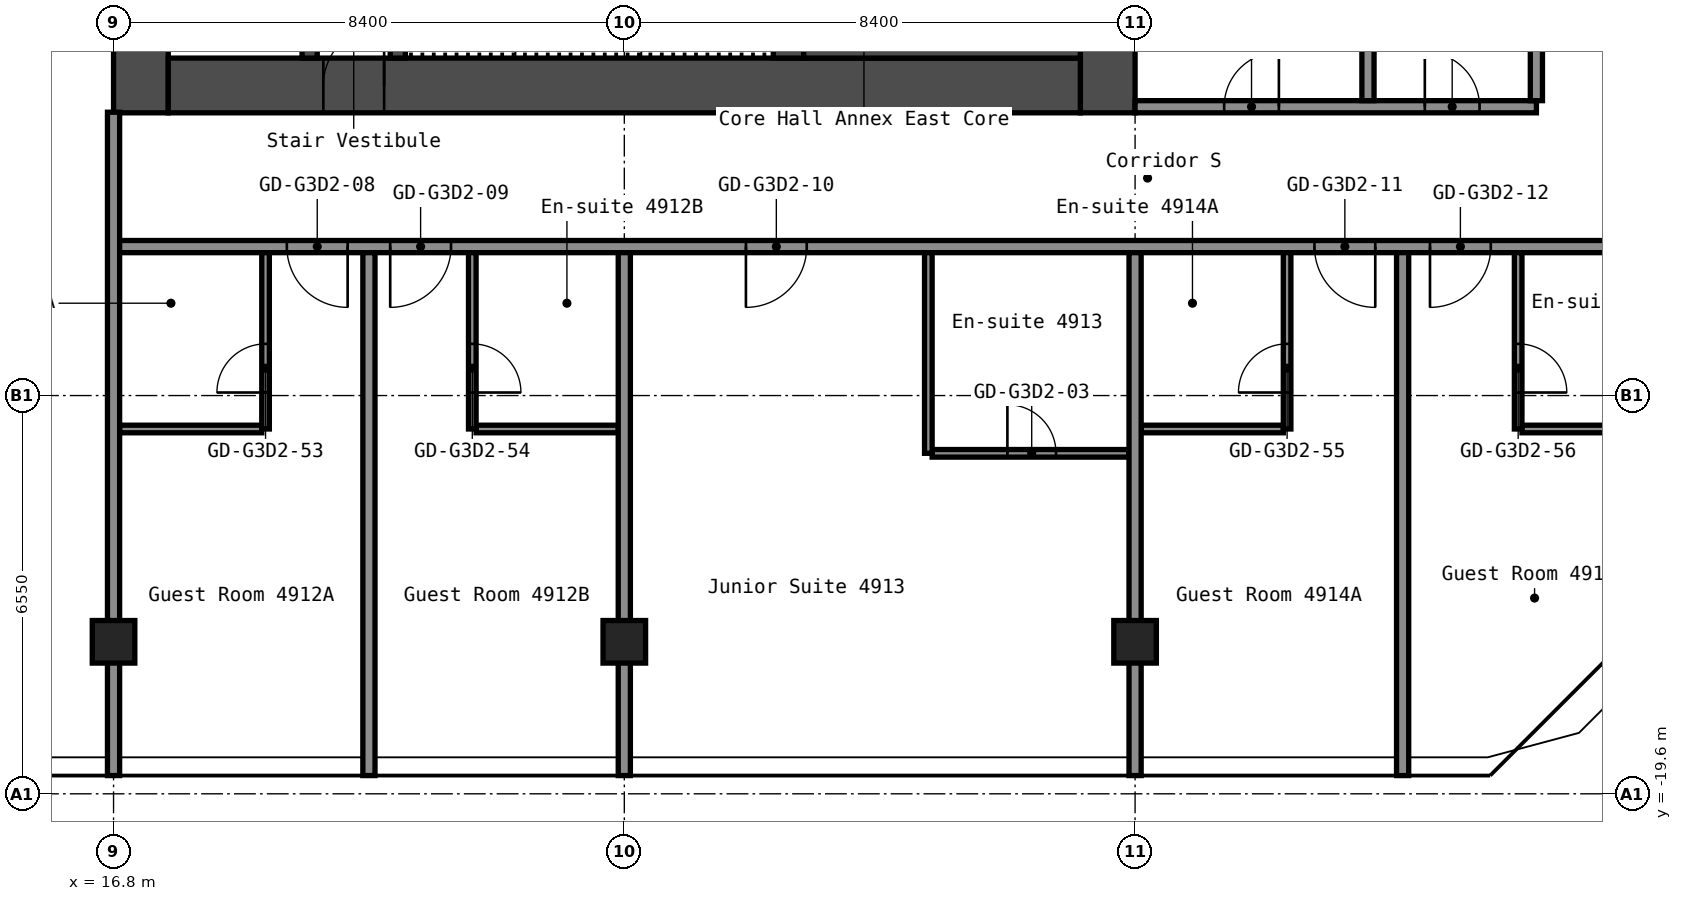
"""IFC4 building model, lengths in metres.
Left out: names, types, materials, properties, quantities, classifications, styles, units other than length and angle.
Written with IfcOpenShell. Run it as: python <this file> out.ifc"""

import sys

from ifc_helpers import new_model, si_unit, direction, frame, frame_2d, origin, origin_2d, place, context, subcontext, project, spatial, rectangle, hollow_rectangle, extrude, element, fill, save


model = new_model("IFC4")
c1 = context("Model", 3, precision=1e-05, world=origin(), true_north=direction((0.0, 1.0)))
c2 = subcontext(c1, "Body", "Model", "MODEL_VIEW")
j1 = project(units=[si_unit("LENGTHUNIT", "METRE"), si_unit("PLANEANGLEUNIT", "RADIAN")], contexts=[c1])
p1 = place(None, origin())
s1 = spatial("IfcSite", under=j1, at=p1, CompositionType="ELEMENT")
p2 = place(p1, origin())
s2 = spatial("IfcBuilding", under=s1, at=p2, CompositionType="ELEMENT")
p3 = place(p2, frame((0.0, 0.0, 172.6)))
s3 = spatial("IfcBuildingStorey", under=s2, at=p3, CompositionType="ELEMENT", Elevation=172.6)
for number, where, z_axis, x_axis in (
    (1, (16.8, -17.1, 0.0), (0.0, 0.0, 1.0), (1.0, 0.0, 0.0)),
    (2, (25.2, -17.1, 0.0), (0.0, 0.0, 1.0), (1.0, 0.0, 0.0)),
    (3, (33.6, -17.1, 0.0), (0.0, 0.0, 1.0), (1.0, 0.0, 0.0)),
):
    element("IfcColumn", number, at=place(p3, frame(where, z_axis=z_axis, x_axis=x_axis)), inside=s3, PredefinedType="COLUMN", context=c2, shape_type="SweptSolid", body=[
        extrude(hollow_rectangle(XDim=0.7, YDim=0.7, WallThickness=0.028, at=origin_2d()), origin(), (0.0, 0.0, 1.0), 2.9),
    ])
p4 = place(p3, frame((17.25, -8.4, 0.0), z_axis=(0.0, 0.0, 1.0), x_axis=(0.0, 1.0, 0.0)))
e4 = element("IfcWall", 4, at=p4, inside=s3, PredefinedType="SHEAR", context=c2, shape_type="SweptSolid", body=[
    extrude(rectangle(XDim=16.8, YDim=0.9, at=frame_2d((8.4, 0.0))), origin(), (0.0, 0.0, 1.0), 2.9),
])
p5 = place(p4, frame((7.1, 0.0, 0.0)))
e5 = element("IfcOpeningElement", 5, at=p5, cuts=e4, PredefinedType="OPENING", context=c2, shape_type="SweptSolid", body=[
    extrude(rectangle(XDim=1.6, YDim=2.1, at=frame_2d((0.8, 1.05))), frame((0.0, 0.46, 0.0), z_axis=(0.0, -1.0, 0.0), x_axis=(1.0, 0.0, 0.0)), (0.0, 0.0, 1.0), 0.92),
])
p6 = place(p3, frame((33.15, -8.4, 0.0), z_axis=(0.0, 0.0, 1.0), x_axis=(0.0, 1.0, 0.0)))
e6 = element("IfcWall", 6, at=p6, inside=s3, PredefinedType="SHEAR", context=c2, shape_type="SweptSolid", body=[
    extrude(rectangle(XDim=16.8, YDim=0.9, at=frame_2d((8.4, 0.0))), origin(), (0.0, 0.0, 1.0), 2.9),
])
p7 = place(p3, frame((17.7, -7.95, 0.0), z_axis=(0.0, 0.0, 1.0), x_axis=(1.0, 0.0, 0.0)))
e7 = element("IfcWall", 7, at=p7, inside=s3, PredefinedType="SHEAR", context=c2, shape_type="SweptSolid", body=[
    extrude(rectangle(XDim=15.0, YDim=0.9, at=frame_2d((7.5, 0.0))), origin(), (0.0, 0.0, 1.0), 2.9),
])
p8 = place(p7, frame((2.55, 0.0, 0.0)))
e8 = element("IfcOpeningElement", 8, at=p8, cuts=e7, PredefinedType="OPENING", context=c2, shape_type="SweptSolid", body=[
    extrude(rectangle(XDim=1.0, YDim=2.1, at=frame_2d((0.5, 1.05))), frame((0.0, 0.46, 0.0), z_axis=(0.0, -1.0, 0.0), x_axis=(1.0, 0.0, 0.0)), (0.0, 0.0, 1.0), 0.92),
])
p9 = place(p3, frame((20.025, -7.5, 0.0), z_axis=(0.0, 0.0, 1.0), x_axis=(0.0, 1.0, 0.0)))
e9 = element("IfcWall", 9, at=p9, inside=s3, PredefinedType="SHEAR", context=c2, shape_type="SweptSolid", body=[
    extrude(rectangle(XDim=6.3, YDim=0.25, at=frame_2d((3.15, 0.0))), origin(), (0.0, 0.0, 1.0), 2.9),
])
p10 = place(p9, frame((2.4, 0.0, 0.0)))
e10 = element("IfcOpeningElement", 10, at=p10, cuts=e9, PredefinedType="OPENING", context=c2, shape_type="SweptSolid", body=[
    extrude(rectangle(XDim=1.0, YDim=2.1, at=frame_2d((0.5, 1.05))), frame((0.0, 0.135, 0.0), z_axis=(0.0, -1.0, 0.0), x_axis=(1.0, 0.0, 0.0)), (0.0, 0.0, 1.0), 0.27),
])
p11 = place(p3, frame((21.475, -7.5, 0.0), z_axis=(0.0, 0.0, 1.0), x_axis=(0.0, 1.0, 0.0)))
e11 = element("IfcWall", 11, at=p11, inside=s3, PredefinedType="SHEAR", context=c2, shape_type="SweptSolid", body=[
    extrude(rectangle(XDim=3.75, YDim=0.25, at=frame_2d((1.875, 0.0))), origin(), (0.0, 0.0, 1.0), 2.9),
])
p12 = place(p11, frame((1.3, 0.0, 0.0)))
e12 = element("IfcOpeningElement", 12, at=p12, cuts=e11, PredefinedType="OPENING", context=c2, shape_type="SweptSolid", body=[
    extrude(rectangle(XDim=1.2, YDim=2.1, at=frame_2d((0.6, 1.05))), frame((0.0, 0.135, 0.0), z_axis=(0.0, -1.0, 0.0), x_axis=(1.0, 0.0, 0.0)), (0.0, 0.0, 1.0), 0.27),
])
p13 = place(p3, frame((27.9, -7.5, 0.0), z_axis=(0.0, 0.0, 1.0), x_axis=(0.0, 1.0, 0.0)))
e13 = element("IfcWall", 13, at=p13, inside=s3, PredefinedType="SHEAR", context=c2, shape_type="SweptSolid", body=[
    extrude(rectangle(XDim=3.75, YDim=0.5, at=frame_2d((1.875, 0.0))), origin(), (0.0, 0.0, 1.0), 2.9),
])
p14 = place(p3, frame((28.15, -6.75, 0.0), z_axis=(0.0, 0.0, 1.0), x_axis=(1.0, 0.0, 0.0)))
e14 = element("IfcWall", 14, at=p14, inside=s3, PredefinedType="SHEAR", context=c2, shape_type="SweptSolid", body=[
    extrude(rectangle(XDim=4.55, YDim=1.5, at=frame_2d((2.275, 0.0))), origin(), (0.0, 0.0, 1.0), 2.9),
])
p15 = place(p3, frame((30.262, -14.0, 0.0), z_axis=(0.0, 0.0, 1.0), x_axis=(1.0, 0.0, 0.0)))
e15 = element("IfcWall", 15, at=p15, inside=s3, PredefinedType="PARTITIONING", context=c2, shape_type="SweptSolid", body=[
    extrude(rectangle(XDim=3.238, YDim=0.125, at=frame_2d((1.619, 0.0))), origin(), (0.0, 0.0, 1.0), 2.9),
])
p16 = place(p15, frame((1.238, 0.0, 0.0)))
e16 = element("IfcOpeningElement", 16, at=p16, cuts=e15, PredefinedType="OPENING", context=c2, shape_type="SweptSolid", body=[
    extrude(rectangle(XDim=0.8, YDim=2.1, at=frame_2d((0.4, 1.05))), frame((0.0, 0.073, 0.0), z_axis=(0.0, -1.0, 0.0), x_axis=(1.0, 0.0, 0.0)), (0.0, 0.0, 1.0), 0.145),
])
for number, where, z_axis, x_axis in (
    (17, (16.9, -13.6, 0.0), (0.0, 0.0, 1.0), (1.0, 0.0, 0.0)),
    (18, (22.762, -13.6, 0.0), (0.0, 0.0, 1.0), (1.0, 0.0, 0.0)),
    (19, (33.7, -13.6, 0.0), (0.0, 0.0, 1.0), (1.0, 0.0, 0.0)),
):
    element("IfcWall", number, at=place(p3, frame(where, z_axis=z_axis, x_axis=x_axis)), inside=s3, PredefinedType="PARTITIONING", context=c2, shape_type="SweptSolid", body=[
        extrude(rectangle(XDim=2.338, YDim=0.125, at=frame_2d((1.169, 0.0))), origin(), (0.0, 0.0, 1.0), 2.9),
    ])
p17 = place(p3, frame((39.962, -13.6, 0.0), z_axis=(0.0, 0.0, 1.0), x_axis=(1.0, 0.0, 0.0)))
e20 = element("IfcWall", 20, at=p17, inside=s3, PredefinedType="PARTITIONING", context=c2, shape_type="SweptSolid", body=[
    extrude(rectangle(XDim=2.738, YDim=0.125, at=frame_2d((1.369, 0.0))), origin(), (0.0, 0.0, 1.0), 2.9),
])
p18 = place(p3, frame((16.8, -10.6, 0.0), z_axis=(0.0, 0.0, 1.0), x_axis=(1.0, 0.0, 0.0)))
e21 = element("IfcWall", 21, at=p18, inside=s3, PredefinedType="PARTITIONING", context=c2, shape_type="SweptSolid", body=[
    extrude(rectangle(XDim=25.9, YDim=0.2, at=frame_2d((12.95, 0.0))), origin(), (0.0, 0.0, 1.0), 2.9),
])
p19 = place(p18, frame((2.85, 0.0, 0.0)))
e22 = element("IfcOpeningElement", 22, at=p19, cuts=e21, PredefinedType="OPENING", context=c2, shape_type="SweptSolid", body=[
    extrude(rectangle(XDim=1.0, YDim=2.1, at=frame_2d((0.5, 1.05))), frame((0.0, 0.11, 0.0), z_axis=(0.0, -1.0, 0.0), x_axis=(1.0, 0.0, 0.0)), (0.0, 0.0, 1.0), 0.22),
])
p20 = place(p18, frame((4.55, 0.0, 0.0)))
e23 = element("IfcOpeningElement", 23, at=p20, cuts=e21, PredefinedType="OPENING", context=c2, shape_type="SweptSolid", body=[
    extrude(rectangle(XDim=1.0, YDim=2.1, at=frame_2d((0.5, 1.05))), frame((0.0, 0.11, 0.0), z_axis=(0.0, -1.0, 0.0), x_axis=(1.0, 0.0, 0.0)), (0.0, 0.0, 1.0), 0.22),
])
p21 = place(p18, frame((10.4, 0.0, 0.0)))
e24 = element("IfcOpeningElement", 24, at=p21, cuts=e21, PredefinedType="OPENING", context=c2, shape_type="SweptSolid", body=[
    extrude(rectangle(XDim=1.0, YDim=2.1, at=frame_2d((0.5, 1.05))), frame((0.0, 0.11, 0.0), z_axis=(0.0, -1.0, 0.0), x_axis=(1.0, 0.0, 0.0)), (0.0, 0.0, 1.0), 0.22),
])
p22 = place(p18, frame((19.75, 0.0, 0.0)))
e25 = element("IfcOpeningElement", 25, at=p22, cuts=e21, PredefinedType="OPENING", context=c2, shape_type="SweptSolid", body=[
    extrude(rectangle(XDim=1.0, YDim=2.1, at=frame_2d((0.5, 1.05))), frame((0.0, 0.11, 0.0), z_axis=(0.0, -1.0, 0.0), x_axis=(1.0, 0.0, 0.0)), (0.0, 0.0, 1.0), 0.22),
])
p23 = place(p18, frame((21.65, 0.0, 0.0)))
e26 = element("IfcOpeningElement", 26, at=p23, cuts=e21, PredefinedType="OPENING", context=c2, shape_type="SweptSolid", body=[
    extrude(rectangle(XDim=1.0, YDim=2.1, at=frame_2d((0.5, 1.05))), frame((0.0, 0.11, 0.0), z_axis=(0.0, -1.0, 0.0), x_axis=(1.0, 0.0, 0.0)), (0.0, 0.0, 1.0), 0.22),
])
p24 = place(p3, frame((33.6, -8.3, 0.0), z_axis=(0.0, 0.0, 1.0), x_axis=(1.0, 0.0, 0.0)))
e27 = element("IfcWall", 27, at=p24, inside=s3, PredefinedType="PARTITIONING", context=c2, shape_type="SweptSolid", body=[
    extrude(rectangle(XDim=6.6, YDim=0.2, at=frame_2d((3.3, 0.0))), origin(), (0.0, 0.0, 1.0), 2.9),
])
p25 = place(p24, frame((1.465, 0.0, 0.0)))
e28 = element("IfcOpeningElement", 28, at=p25, cuts=e27, PredefinedType="OPENING", context=c2, shape_type="SweptSolid", body=[
    extrude(rectangle(XDim=0.9, YDim=2.1, at=frame_2d((0.45, 1.05))), frame((0.0, 0.11, 0.0), z_axis=(0.0, -1.0, 0.0), x_axis=(1.0, 0.0, 0.0)), (0.0, 0.0, 1.0), 0.22),
])
p26 = place(p24, frame((4.765, 0.0, 0.0)))
e29 = element("IfcOpeningElement", 29, at=p26, cuts=e27, PredefinedType="OPENING", context=c2, shape_type="SweptSolid", body=[
    extrude(rectangle(XDim=0.9, YDim=2.1, at=frame_2d((0.45, 1.05))), frame((0.0, 0.11, 0.0), z_axis=(0.0, -1.0, 0.0), x_axis=(1.0, 0.0, 0.0)), (0.0, 0.0, 1.0), 0.22),
])
p27 = place(p3, frame((16.8, -19.3, 0.0), z_axis=(0.0, 0.0, 1.0), x_axis=(0.0, 1.0, 0.0)))
e30 = element("IfcWall", 30, at=p27, inside=s3, PredefinedType="PARTITIONING", context=c2, shape_type="SweptSolid", body=[
    extrude(rectangle(XDim=10.91, YDim=0.2, at=frame_2d((5.455, 0.0))), origin(), (0.0, 0.0, 1.0), 2.9),
])
p28 = place(p3, frame((19.3, -13.6, 0.0), z_axis=(0.0, 0.0, 1.0), x_axis=(0.0, 1.0, 0.0)))
e31 = element("IfcWall", 31, at=p28, inside=s3, PredefinedType="PARTITIONING", context=c2, shape_type="SweptSolid", body=[
    extrude(rectangle(XDim=2.9, YDim=0.125, at=frame_2d((1.45, 0.0))), origin(), (0.0, 0.0, 1.0), 2.9),
])
p29 = place(p28, frame((0.6, 0.0, 0.0)))
e32 = element("IfcOpeningElement", 32, at=p29, cuts=e31, PredefinedType="OPENING", context=c2, shape_type="SweptSolid", body=[
    extrude(rectangle(XDim=0.8, YDim=2.1, at=frame_2d((0.4, 1.05))), frame((0.0, 0.073, 0.0), z_axis=(0.0, -1.0, 0.0), x_axis=(1.0, 0.0, 0.0)), (0.0, 0.0, 1.0), 0.145),
])
p30 = place(p3, frame((21.0, -19.3, 0.0), z_axis=(0.0, 0.0, 1.0), x_axis=(0.0, 1.0, 0.0)))
e33 = element("IfcWall", 33, at=p30, inside=s3, PredefinedType="PARTITIONING", context=c2, shape_type="SweptSolid", body=[
    extrude(rectangle(XDim=8.6, YDim=0.2, at=frame_2d((4.3, 0.0))), origin(), (0.0, 0.0, 1.0), 2.9),
])
p31 = place(p3, frame((22.7, -13.6, 0.0), z_axis=(0.0, 0.0, 1.0), x_axis=(0.0, 1.0, 0.0)))
e34 = element("IfcWall", 34, at=p31, inside=s3, PredefinedType="PARTITIONING", context=c2, shape_type="SweptSolid", body=[
    extrude(rectangle(XDim=2.9, YDim=0.125, at=frame_2d((1.45, 0.0))), origin(), (0.0, 0.0, 1.0), 2.9),
])
p32 = place(p31, frame((0.6, 0.0, 0.0)))
e35 = element("IfcOpeningElement", 35, at=p32, cuts=e34, PredefinedType="OPENING", context=c2, shape_type="SweptSolid", body=[
    extrude(rectangle(XDim=0.8, YDim=2.1, at=frame_2d((0.4, 1.05))), frame((0.0, 0.073, 0.0), z_axis=(0.0, -1.0, 0.0), x_axis=(1.0, 0.0, 0.0)), (0.0, 0.0, 1.0), 0.145),
])
p33 = place(p3, frame((25.2, -19.3, 0.0), z_axis=(0.0, 0.0, 1.0), x_axis=(0.0, 1.0, 0.0)))
e36 = element("IfcWall", 36, at=p33, inside=s3, PredefinedType="PARTITIONING", context=c2, shape_type="SweptSolid", body=[
    extrude(rectangle(XDim=8.6, YDim=0.2, at=frame_2d((4.3, 0.0))), origin(), (0.0, 0.0, 1.0), 2.9),
])
p34 = place(p3, frame((30.2, -14.0, 0.0), z_axis=(0.0, 0.0, 1.0), x_axis=(0.0, 1.0, 0.0)))
e37 = element("IfcWall", 37, at=p34, inside=s3, PredefinedType="PARTITIONING", context=c2, shape_type="SweptSolid", body=[
    extrude(rectangle(XDim=3.3, YDim=0.125, at=frame_2d((1.65, 0.0))), origin(), (0.0, 0.0, 1.0), 2.9),
])
p35 = place(p3, frame((33.6, -19.3, 0.0), z_axis=(0.0, 0.0, 1.0), x_axis=(0.0, 1.0, 0.0)))
e38 = element("IfcWall", 38, at=p35, inside=s3, PredefinedType="PARTITIONING", context=c2, shape_type="SweptSolid", body=[
    extrude(rectangle(XDim=8.6, YDim=0.2, at=frame_2d((4.3, 0.0))), origin(), (0.0, 0.0, 1.0), 2.9),
])
p36 = place(p3, frame((36.1, -13.6, 0.0), z_axis=(0.0, 0.0, 1.0), x_axis=(0.0, 1.0, 0.0)))
e39 = element("IfcWall", 39, at=p36, inside=s3, PredefinedType="PARTITIONING", context=c2, shape_type="SweptSolid", body=[
    extrude(rectangle(XDim=2.9, YDim=0.125, at=frame_2d((1.45, 0.0))), origin(), (0.0, 0.0, 1.0), 2.9),
])
p37 = place(p36, frame((0.6, 0.0, 0.0)))
e40 = element("IfcOpeningElement", 40, at=p37, cuts=e39, PredefinedType="OPENING", context=c2, shape_type="SweptSolid", body=[
    extrude(rectangle(XDim=0.8, YDim=2.1, at=frame_2d((0.4, 1.05))), frame((0.0, 0.073, 0.0), z_axis=(0.0, -1.0, 0.0), x_axis=(1.0, 0.0, 0.0)), (0.0, 0.0, 1.0), 0.145),
])
p38 = place(p3, frame((37.43, -8.2, 0.0), z_axis=(0.0, 0.0, 1.0), x_axis=(0.0, 1.0, 0.0)))
e41 = element("IfcWall", 41, at=p38, inside=s3, PredefinedType="PARTITIONING", context=c2, shape_type="SweptSolid", body=[
    extrude(rectangle(XDim=8.2, YDim=0.2, at=frame_2d((4.1, 0.0))), origin(), (0.0, 0.0, 1.0), 2.9),
])
p39 = place(p3, frame((38.0, -19.3, 0.0), z_axis=(0.0, 0.0, 1.0), x_axis=(0.0, 1.0, 0.0)))
e42 = element("IfcWall", 42, at=p39, inside=s3, PredefinedType="PARTITIONING", context=c2, shape_type="SweptSolid", body=[
    extrude(rectangle(XDim=8.6, YDim=0.2, at=frame_2d((4.3, 0.0))), origin(), (0.0, 0.0, 1.0), 2.9),
])
p40 = place(p3, frame((39.9, -13.6, 0.0), z_axis=(0.0, 0.0, 1.0), x_axis=(0.0, 1.0, 0.0)))
e43 = element("IfcWall", 43, at=p40, inside=s3, PredefinedType="PARTITIONING", context=c2, shape_type="SweptSolid", body=[
    extrude(rectangle(XDim=2.9, YDim=0.125, at=frame_2d((1.45, 0.0))), origin(), (0.0, 0.0, 1.0), 2.9),
])
p41 = place(p40, frame((0.6, 0.0, 0.0)))
e44 = element("IfcOpeningElement", 44, at=p41, cuts=e43, PredefinedType="OPENING", context=c2, shape_type="SweptSolid", body=[
    extrude(rectangle(XDim=0.8, YDim=2.1, at=frame_2d((0.4, 1.05))), frame((0.0, 0.073, 0.0), z_axis=(0.0, -1.0, 0.0), x_axis=(1.0, 0.0, 0.0)), (0.0, 0.0, 1.0), 0.145),
])
p42 = place(p3, frame((40.2, -8.2, 0.0), z_axis=(0.0, 0.0, 1.0), x_axis=(0.0, 1.0, 0.0)))
e45 = element("IfcWall", 45, at=p42, inside=s3, PredefinedType="PARTITIONING", context=c2, shape_type="SweptSolid", body=[
    extrude(rectangle(XDim=16.4, YDim=0.2, at=frame_2d((8.2, 0.0))), origin(), (0.0, 0.0, 1.0), 2.9),
])
p43 = place(p8, origin())
e46 = element("IfcDoor", 46, at=p43, inside=s3, OperationType="SINGLE_SWING_LEFT", PredefinedType="DOOR", context=c2, shape_type="SweptSolid", body=[
    extrude(rectangle(XDim=1.0, YDim=2.1, at=frame_2d((0.5, 1.05))), frame((0.0, 0.025, 0.0), z_axis=(0.0, -1.0, 0.0), x_axis=(1.0, 0.0, 0.0)), (0.0, 0.0, 1.0), 0.05),
])
fill(e8, e46)
p44 = place(p16, origin())
e47 = element("IfcDoor", 47, at=p44, inside=s3, OperationType="SINGLE_SWING_RIGHT", PredefinedType="DOOR", context=c2, shape_type="SweptSolid", body=[
    extrude(rectangle(XDim=0.8, YDim=2.1, at=frame_2d((0.4, 1.05))), frame((0.0, 0.025, 0.0), z_axis=(0.0, -1.0, 0.0), x_axis=(1.0, 0.0, 0.0)), (0.0, 0.0, 1.0), 0.05),
])
fill(e16, e47)
p45 = place(p19, origin())
e48 = element("IfcDoor", 48, at=p45, inside=s3, OperationType="SINGLE_SWING_RIGHT", PredefinedType="DOOR", context=c2, shape_type="SweptSolid", body=[
    extrude(rectangle(XDim=1.0, YDim=2.1, at=frame_2d((0.5, 1.05))), frame((0.0, 0.025, 0.0), z_axis=(0.0, -1.0, 0.0), x_axis=(1.0, 0.0, 0.0)), (0.0, 0.0, 1.0), 0.05),
])
fill(e22, e48)
p46 = place(p20, origin())
e49 = element("IfcDoor", 49, at=p46, inside=s3, OperationType="SINGLE_SWING_LEFT", PredefinedType="DOOR", context=c2, shape_type="SweptSolid", body=[
    extrude(rectangle(XDim=1.0, YDim=2.1, at=frame_2d((0.5, 1.05))), frame((0.0, 0.025, 0.0), z_axis=(0.0, -1.0, 0.0), x_axis=(1.0, 0.0, 0.0)), (0.0, 0.0, 1.0), 0.05),
])
fill(e23, e49)
p47 = place(p21, origin())
e50 = element("IfcDoor", 50, at=p47, inside=s3, OperationType="SINGLE_SWING_LEFT", PredefinedType="DOOR", context=c2, shape_type="SweptSolid", body=[
    extrude(rectangle(XDim=1.0, YDim=2.1, at=frame_2d((0.5, 1.05))), frame((0.0, 0.025, 0.0), z_axis=(0.0, -1.0, 0.0), x_axis=(1.0, 0.0, 0.0)), (0.0, 0.0, 1.0), 0.05),
])
fill(e24, e50)
p48 = place(p22, origin())
e51 = element("IfcDoor", 51, at=p48, inside=s3, OperationType="SINGLE_SWING_RIGHT", PredefinedType="DOOR", context=c2, shape_type="SweptSolid", body=[
    extrude(rectangle(XDim=1.0, YDim=2.1, at=frame_2d((0.5, 1.05))), frame((0.0, 0.025, 0.0), z_axis=(0.0, -1.0, 0.0), x_axis=(1.0, 0.0, 0.0)), (0.0, 0.0, 1.0), 0.05),
])
fill(e25, e51)
p49 = place(p23, origin())
e52 = element("IfcDoor", 52, at=p49, inside=s3, OperationType="SINGLE_SWING_LEFT", PredefinedType="DOOR", context=c2, shape_type="SweptSolid", body=[
    extrude(rectangle(XDim=1.0, YDim=2.1, at=frame_2d((0.5, 1.05))), frame((0.0, 0.025, 0.0), z_axis=(0.0, -1.0, 0.0), x_axis=(1.0, 0.0, 0.0)), (0.0, 0.0, 1.0), 0.05),
])
fill(e26, e52)
p50 = place(p25, origin())
e53 = element("IfcDoor", 53, at=p50, inside=s3, OperationType="SINGLE_SWING_LEFT", PredefinedType="DOOR", context=c2, shape_type="SweptSolid", body=[
    extrude(rectangle(XDim=0.9, YDim=2.1, at=frame_2d((0.45, 1.05))), frame((0.0, 0.025, 0.0), z_axis=(0.0, -1.0, 0.0), x_axis=(1.0, 0.0, 0.0)), (0.0, 0.0, 1.0), 0.05),
])
fill(e28, e53)
p51 = place(p26, origin())
e54 = element("IfcDoor", 54, at=p51, inside=s3, OperationType="SINGLE_SWING_RIGHT", PredefinedType="DOOR", context=c2, shape_type="SweptSolid", body=[
    extrude(rectangle(XDim=0.9, YDim=2.1, at=frame_2d((0.45, 1.05))), frame((0.0, 0.025, 0.0), z_axis=(0.0, -1.0, 0.0), x_axis=(1.0, 0.0, 0.0)), (0.0, 0.0, 1.0), 0.05),
])
fill(e29, e54)
p52 = place(p29, origin())
e55 = element("IfcDoor", 55, at=p52, inside=s3, OperationType="SINGLE_SWING_RIGHT", PredefinedType="DOOR", context=c2, shape_type="SweptSolid", body=[
    extrude(rectangle(XDim=0.8, YDim=2.1, at=frame_2d((0.4, 1.05))), frame((0.0, 0.025, 0.0), z_axis=(0.0, -1.0, 0.0), x_axis=(1.0, 0.0, 0.0)), (0.0, 0.0, 1.0), 0.05),
])
fill(e32, e55)
p53 = place(p32, origin())
e56 = element("IfcDoor", 56, at=p53, inside=s3, OperationType="SINGLE_SWING_LEFT", PredefinedType="DOOR", context=c2, shape_type="SweptSolid", body=[
    extrude(rectangle(XDim=0.8, YDim=2.1, at=frame_2d((0.4, 1.05))), frame((0.0, 0.025, 0.0), z_axis=(0.0, -1.0, 0.0), x_axis=(1.0, 0.0, 0.0)), (0.0, 0.0, 1.0), 0.05),
])
fill(e35, e56)
p54 = place(p37, origin())
e57 = element("IfcDoor", 57, at=p54, inside=s3, OperationType="SINGLE_SWING_RIGHT", PredefinedType="DOOR", context=c2, shape_type="SweptSolid", body=[
    extrude(rectangle(XDim=0.8, YDim=2.1, at=frame_2d((0.4, 1.05))), frame((0.0, 0.025, 0.0), z_axis=(0.0, -1.0, 0.0), x_axis=(1.0, 0.0, 0.0)), (0.0, 0.0, 1.0), 0.05),
])
fill(e40, e57)
p55 = place(p41, origin())
e58 = element("IfcDoor", 58, at=p55, inside=s3, OperationType="SINGLE_SWING_LEFT", PredefinedType="DOOR", context=c2, shape_type="SweptSolid", body=[
    extrude(rectangle(XDim=0.8, YDim=2.1, at=frame_2d((0.4, 1.05))), frame((0.0, 0.025, 0.0), z_axis=(0.0, -1.0, 0.0), x_axis=(1.0, 0.0, 0.0)), (0.0, 0.0, 1.0), 0.05),
])
fill(e44, e58)
save(model, sys.argv[1])
